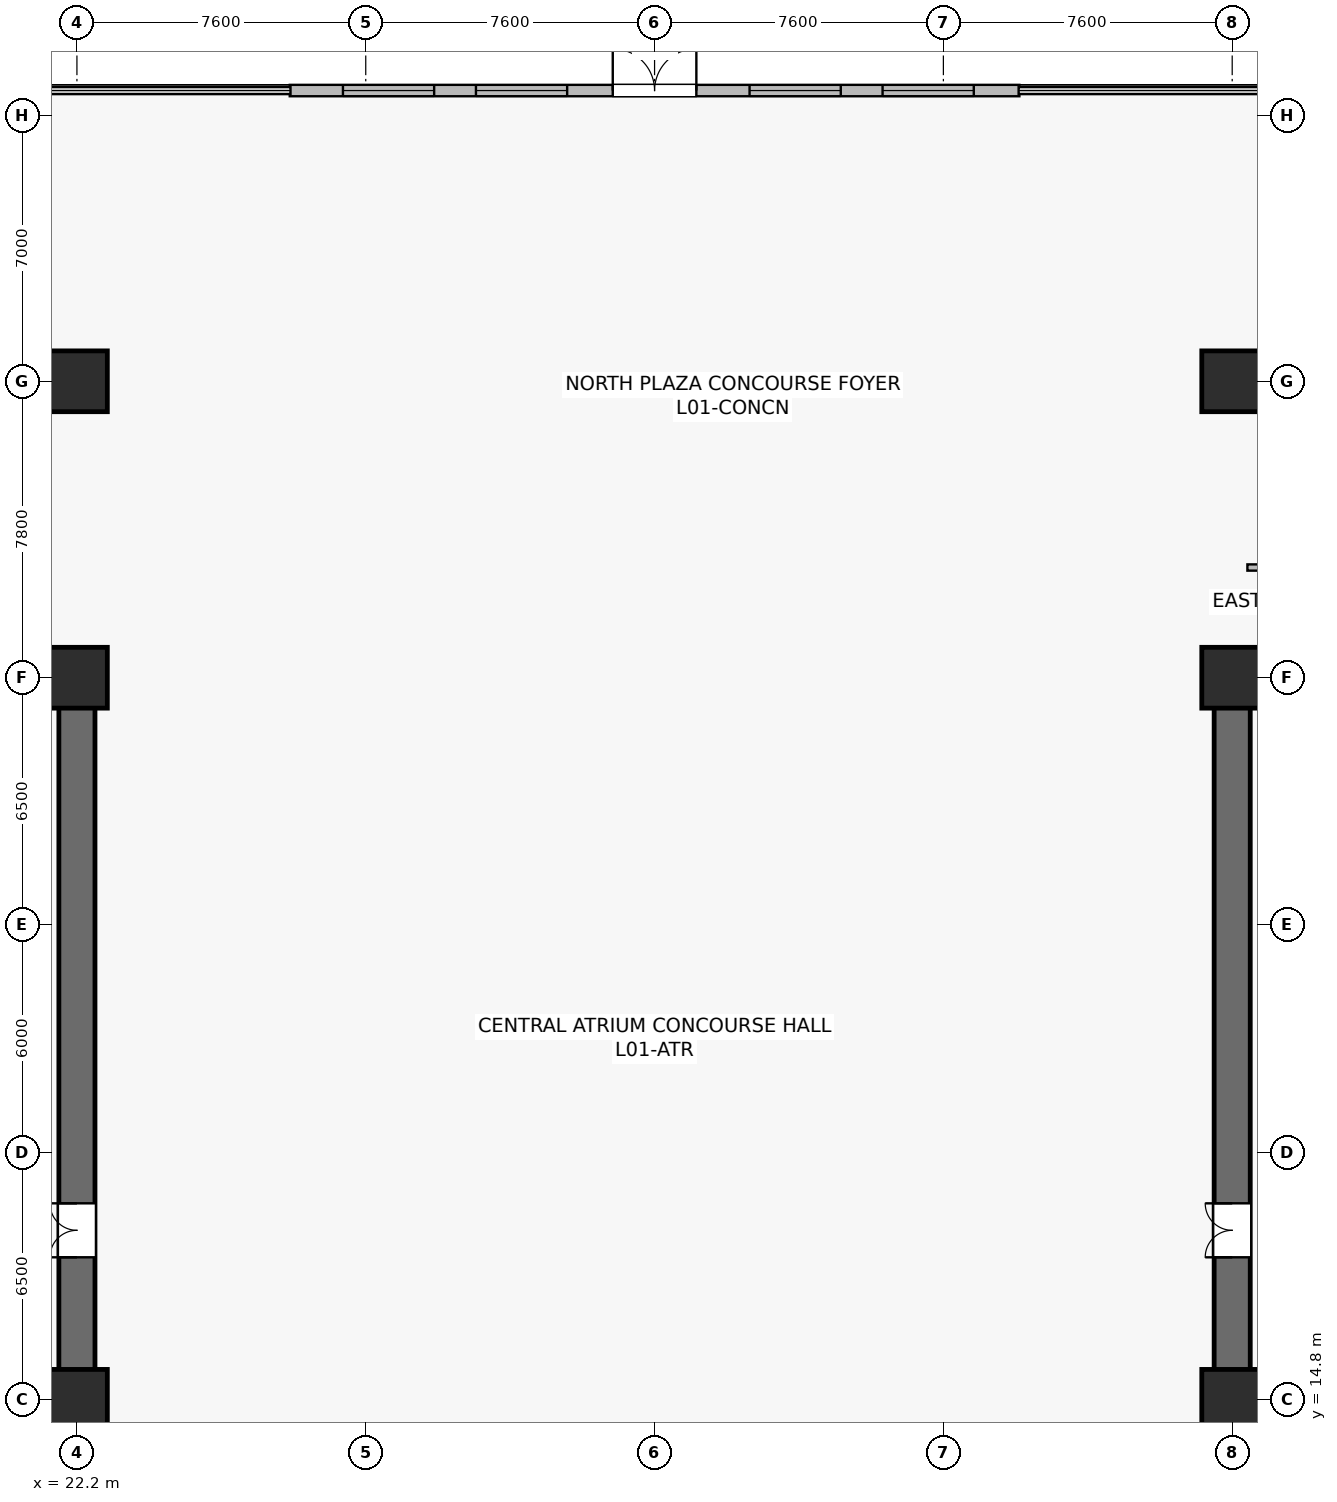
"""IFC4 building model, lengths in metres.
Left out: names, types, materials, properties, quantities, classifications, styles, units other than length and angle.
Written with IfcOpenShell. Run it as: python <this file> out.ifc"""

import sys

from ifc_helpers import new_model, si_unit, direction, frame, frame_2d, origin, origin_2d, place, context, subcontext, project, spatial, rectangle, extrude, source, transform, mapped, element, fill, save


model = new_model("IFC4")
c1 = context("Model", 3, precision=1e-05, world=origin(), true_north=direction((0.0, 1.0)))
c2 = subcontext(c1, "Body", "Model", "MODEL_VIEW")
j1 = project(units=[si_unit("LENGTHUNIT", "METRE"), si_unit("PLANEANGLEUNIT", "RADIAN")], contexts=[c1])
p1 = place(None, origin())
s1 = spatial("IfcSite", under=j1, at=p1, CompositionType="ELEMENT")
p2 = place(p1, origin())
s2 = spatial("IfcBuilding", under=s1, at=p2, CompositionType="ELEMENT")
p3 = place(p2, origin())
s3 = spatial("IfcBuildingStorey", under=s2, at=p3, CompositionType="ELEMENT", Elevation=0.0)
p4 = place(p3, frame((6.925, 14.8, 0.0), z_axis=(0.0, 0.0, 1.0), x_axis=(1.0, 0.0, 0.0)))
e1 = element("IfcWall", 1, at=p4, inside=s3, PredefinedType="SHEAR", context=c2, shape_type="SweptSolid", body=[
    extrude(rectangle(XDim=15.75, YDim=0.95, at=frame_2d((7.875, 0.0))), origin(), (0.0, 0.0, 1.0), 5.05),
])
p5 = place(p4, frame((12.275, 0.0, 0.0)))
e2 = element("IfcOpeningElement", 2, at=p5, cuts=e1, PredefinedType="OPENING", context=c2, shape_type="SweptSolid", body=[
    extrude(rectangle(XDim=1.2, YDim=2.16, at=frame_2d((0.6, 1.08))), frame((0.0, 0.485, 0.0), z_axis=(0.0, -1.0, 0.0), x_axis=(1.0, 0.0, 0.0)), (0.0, 0.0, 1.0), 0.97),
])
p6 = place(p3, frame((6.925, 33.8, 0.0), z_axis=(0.0, 0.0, 1.0), x_axis=(1.0, 0.0, 0.0)))
e3 = element("IfcWall", 3, at=p6, inside=s3, PredefinedType="SHEAR", context=c2, shape_type="SweptSolid", body=[
    extrude(rectangle(XDim=15.75, YDim=0.95, at=frame_2d((7.875, 0.0))), origin(), (0.0, 0.0, 1.0), 5.05),
])
p7 = place(p6, frame((8.525, 0.0, 0.0)))
e4 = element("IfcOpeningElement", 4, at=p7, cuts=e3, PredefinedType="OPENING", context=c2, shape_type="SweptSolid", body=[
    extrude(rectangle(XDim=0.95, YDim=2.15, at=frame_2d((0.475, 1.075))), frame((0.0, 0.485, 0.0), z_axis=(0.0, -1.0, 0.0), x_axis=(1.0, 0.0, 0.0)), (0.0, 0.0, 1.0), 0.97),
])
p8 = place(p6, frame((12.065, 0.0, 0.0)))
e5 = element("IfcOpeningElement", 5, at=p8, cuts=e3, PredefinedType="OPENING", context=c2, shape_type="SweptSolid", body=[
    extrude(rectangle(XDim=0.95, YDim=2.15, at=frame_2d((0.475, 1.075))), frame((0.0, 0.485, 0.0), z_axis=(0.0, -1.0, 0.0), x_axis=(1.0, 0.0, 0.0)), (0.0, 0.0, 1.0), 0.97),
])
p9 = place(p3, frame((22.2, 15.275, 0.0), z_axis=(0.0, 0.0, 1.0), x_axis=(0.0, 1.0, 0.0)))
e6 = element("IfcWall", 6, at=p9, inside=s3, PredefinedType="SHEAR", context=c2, shape_type="SweptSolid", body=[
    extrude(rectangle(XDim=18.05, YDim=0.95, at=frame_2d((9.025, 0.0))), origin(), (0.0, 0.0, 1.0), 5.05),
])
p10 = place(p9, frame((3.275, 0.0, 0.0)))
e7 = element("IfcOpeningElement", 7, at=p10, cuts=e6, PredefinedType="OPENING", context=c2, shape_type="SweptSolid", body=[
    extrude(rectangle(XDim=1.42, YDim=2.2, at=frame_2d((0.71, 1.1))), frame((0.0, 0.485, 0.0), z_axis=(0.0, -1.0, 0.0), x_axis=(1.0, 0.0, 0.0)), (0.0, 0.0, 1.0), 0.97),
])
p11 = place(p3, frame((52.125, 14.8, 0.0), z_axis=(0.0, 0.0, 1.0), x_axis=(1.0, 0.0, 0.0)))
e8 = element("IfcWall", 8, at=p11, inside=s3, PredefinedType="SHEAR", context=c2, shape_type="SweptSolid", body=[
    extrude(rectangle(XDim=15.75, YDim=0.95, at=frame_2d((7.875, 0.0))), origin(), (0.0, 0.0, 1.0), 5.05),
])
p12 = place(p11, frame((2.275, 0.0, 0.0)))
e9 = element("IfcOpeningElement", 9, at=p12, cuts=e8, PredefinedType="OPENING", context=c2, shape_type="SweptSolid", body=[
    extrude(rectangle(XDim=1.2, YDim=2.16, at=frame_2d((0.6, 1.08))), frame((0.0, 0.485, 0.0), z_axis=(0.0, -1.0, 0.0), x_axis=(1.0, 0.0, 0.0)), (0.0, 0.0, 1.0), 0.97),
])
p13 = place(p3, frame((52.125, 33.8, 0.0), z_axis=(0.0, 0.0, 1.0), x_axis=(1.0, 0.0, 0.0)))
e10 = element("IfcWall", 10, at=p13, inside=s3, PredefinedType="SHEAR", context=c2, shape_type="SweptSolid", body=[
    extrude(rectangle(XDim=15.75, YDim=0.95, at=frame_2d((7.875, 0.0))), origin(), (0.0, 0.0, 1.0), 5.05),
])
p14 = place(p13, frame((6.275, 0.0, 0.0)))
e11 = element("IfcOpeningElement", 11, at=p14, cuts=e10, PredefinedType="OPENING", context=c2, shape_type="SweptSolid", body=[
    extrude(rectangle(XDim=0.95, YDim=2.15, at=frame_2d((0.475, 1.075))), frame((0.0, 0.485, 0.0), z_axis=(0.0, -1.0, 0.0), x_axis=(1.0, 0.0, 0.0)), (0.0, 0.0, 1.0), 0.97),
])
p15 = place(p13, frame((2.735, 0.0, 0.0)))
e12 = element("IfcOpeningElement", 12, at=p15, cuts=e10, PredefinedType="OPENING", context=c2, shape_type="SweptSolid", body=[
    extrude(rectangle(XDim=0.95, YDim=2.15, at=frame_2d((0.475, 1.075))), frame((0.0, 0.485, 0.0), z_axis=(0.0, -1.0, 0.0), x_axis=(1.0, 0.0, 0.0)), (0.0, 0.0, 1.0), 0.97),
])
p16 = place(p3, frame((52.6, 15.275, 0.0), z_axis=(0.0, 0.0, 1.0), x_axis=(0.0, 1.0, 0.0)))
e13 = element("IfcWall", 13, at=p16, inside=s3, PredefinedType="SHEAR", context=c2, shape_type="SweptSolid", body=[
    extrude(rectangle(XDim=18.05, YDim=0.95, at=frame_2d((9.025, 0.0))), origin(), (0.0, 0.0, 1.0), 5.05),
])
p17 = place(p16, frame((3.275, 0.0, 0.0)))
e14 = element("IfcOpeningElement", 14, at=p17, cuts=e13, PredefinedType="OPENING", context=c2, shape_type="SweptSolid", body=[
    extrude(rectangle(XDim=1.42, YDim=2.2, at=frame_2d((0.71, 1.1))), frame((0.0, 0.485, 0.0), z_axis=(0.0, -1.0, 0.0), x_axis=(1.0, 0.0, 0.0)), (0.0, 0.0, 1.0), 0.97),
])
m1 = source(origin(), c2, "Body", "SweptSolid", [
    extrude(rectangle(XDim=1.6, YDim=1.6, at=origin_2d()), origin(), (0.0, 0.0, 1.0), 5.4),
])
for number, where, z_axis, x_axis in (
    (15, (22.2, 14.8, 0.0), (0.0, 0.0, 1.0), (1.0, 0.0, 0.0)),
    (16, (22.2, 33.8, 0.0), (0.0, 0.0, 1.0), (1.0, 0.0, 0.0)),
    (17, (22.2, 41.6, 0.0), (0.0, 0.0, 1.0), (1.0, 0.0, 0.0)),
    (18, (52.6, 14.8, 0.0), (0.0, 0.0, 1.0), (1.0, 0.0, 0.0)),
    (19, (52.6, 33.8, 0.0), (0.0, 0.0, 1.0), (1.0, 0.0, 0.0)),
    (20, (52.6, 41.6, 0.0), (0.0, 0.0, 1.0), (1.0, 0.0, 0.0)),
):
    element("IfcColumn", number, at=place(p3, frame(where, z_axis=z_axis, x_axis=x_axis)), inside=s3, PredefinedType="COLUMN", context=c2, shape_type="MappedRepresentation", body=[
        mapped(m1, transform((0.0, 0.0, 0.0), scale=1.0)),
    ])
p18 = place(p3, frame((27.8, 49.25, 0.0), z_axis=(0.0, 0.0, 1.0), x_axis=(1.0, 0.0, 0.0)))
e21 = element("IfcWall", 21, at=p18, inside=s3, PredefinedType="STANDARD", context=c2, shape_type="SweptSolid", body=[
    extrude(rectangle(XDim=19.2, YDim=0.3, at=frame_2d((9.6, 0.0))), origin(), (0.0, 0.0, 1.0), 5.05),
])
p19 = place(p18, frame((8.5, 0.0, 0.0)))
e22 = element("IfcOpeningElement", 22, at=p19, cuts=e21, PredefinedType="OPENING", context=c2, shape_type="SweptSolid", body=[
    extrude(rectangle(XDim=2.2, YDim=2.6, at=frame_2d((1.1, 1.3))), frame((0.0, 0.16, 0.0), z_axis=(0.0, -1.0, 0.0), x_axis=(1.0, 0.0, 0.0)), (0.0, 0.0, 1.0), 0.32),
])
p20 = place(p18, frame((1.4, 0.0, 0.9)))
e23 = element("IfcOpeningElement", 23, at=p20, cuts=e21, PredefinedType="OPENING", context=c2, shape_type="SweptSolid", body=[
    extrude(rectangle(XDim=2.4, YDim=2.8, at=frame_2d((1.2, 1.4))), frame((0.0, 0.16, 0.0), z_axis=(0.0, -1.0, 0.0), x_axis=(1.0, 0.0, 0.0)), (0.0, 0.0, 1.0), 0.32),
])
p21 = place(p18, frame((4.9, 0.0, 0.9)))
e24 = element("IfcOpeningElement", 24, at=p21, cuts=e21, PredefinedType="OPENING", context=c2, shape_type="SweptSolid", body=[
    extrude(rectangle(XDim=2.4, YDim=2.8, at=frame_2d((1.2, 1.4))), frame((0.0, 0.16, 0.0), z_axis=(0.0, -1.0, 0.0), x_axis=(1.0, 0.0, 0.0)), (0.0, 0.0, 1.0), 0.32),
])
p22 = place(p18, frame((12.1, 0.0, 0.9)))
e25 = element("IfcOpeningElement", 25, at=p22, cuts=e21, PredefinedType="OPENING", context=c2, shape_type="SweptSolid", body=[
    extrude(rectangle(XDim=2.4, YDim=2.8, at=frame_2d((1.2, 1.4))), frame((0.0, 0.16, 0.0), z_axis=(0.0, -1.0, 0.0), x_axis=(1.0, 0.0, 0.0)), (0.0, 0.0, 1.0), 0.32),
])
p23 = place(p18, frame((15.6, 0.0, 0.9)))
e26 = element("IfcOpeningElement", 26, at=p23, cuts=e21, PredefinedType="OPENING", context=c2, shape_type="SweptSolid", body=[
    extrude(rectangle(XDim=2.4, YDim=2.8, at=frame_2d((1.2, 1.4))), frame((0.0, 0.16, 0.0), z_axis=(0.0, -1.0, 0.0), x_axis=(1.0, 0.0, 0.0)), (0.0, 0.0, 1.0), 0.32),
])
p24 = place(p3, frame((22.45, 14.4, 0.0), z_axis=(0.0, 0.0, 1.0), x_axis=(0.0, -1.0, 0.0)))
e27 = element("IfcWall", 27, at=p24, inside=s3, PredefinedType="SOLIDWALL", context=c2, shape_type="SweptSolid", body=[
    extrude(rectangle(XDim=15.05, YDim=0.2, at=frame_2d((7.525, 0.0))), origin(), (0.0, 0.0, 1.0), 4.335),
])
p25 = place(p24, frame((3.43, 0.0, 0.0)))
e28 = element("IfcOpeningElement", 28, at=p25, cuts=e27, PredefinedType="OPENING", context=c2, shape_type="SweptSolid", body=[
    extrude(rectangle(XDim=1.42, YDim=2.2, at=frame_2d((0.71, 1.1))), frame((0.0, 0.11, 0.0), z_axis=(0.0, -1.0, 0.0), x_axis=(1.0, 0.0, 0.0)), (0.0, 0.0, 1.0), 0.22),
])
p26 = place(p3, frame((53.0, 36.7, 0.0), z_axis=(0.0, 0.0, 1.0), x_axis=(1.0, 0.0, 0.0)))
e29 = element("IfcWall", 29, at=p26, inside=s3, PredefinedType="PARTITIONING", context=c2, shape_type="SweptSolid", body=[
    extrude(rectangle(XDim=14.6, YDim=0.165, at=frame_2d((7.3, 0.0))), origin(), (0.0, 0.0, 1.0), 4.335),
])
p27 = place(p26, frame((6.4, 0.0, 0.0)))
e30 = element("IfcOpeningElement", 30, at=p27, cuts=e29, PredefinedType="OPENING", context=c2, shape_type="SweptSolid", body=[
    extrude(rectangle(XDim=1.1, YDim=2.18, at=frame_2d((0.55, 1.09))), frame((0.0, 0.093, 0.0), z_axis=(0.0, -1.0, 0.0), x_axis=(1.0, 0.0, 0.0)), (0.0, 0.0, 1.0), 0.185),
])
m2 = source(origin(), c2, "Body", "SweptSolid", [
    extrude(rectangle(XDim=2.2, YDim=2.6, at=frame_2d((1.1, 1.3))), frame((0.0, 0.025, 0.0), z_axis=(0.0, -1.0, 0.0), x_axis=(1.0, 0.0, 0.0)), (0.0, 0.0, 1.0), 0.05),
])
p28 = place(p19, origin())
e31 = element("IfcDoor", 31, at=p28, inside=s3, OperationType="DOUBLE_DOOR_SINGLE_SWING", PredefinedType="DOOR", context=c2, shape_type="MappedRepresentation", body=[
    mapped(m2, transform((0.0, 0.0, 0.0), scale=1.0)),
])
fill(e22, e31)
m3 = source(origin(), c2, "Body", "SweptSolid", [
    extrude(rectangle(XDim=2.4, YDim=2.8, at=frame_2d((1.2, 1.4))), frame((0.0, 0.03, 0.0), z_axis=(0.0, -1.0, 0.0), x_axis=(1.0, 0.0, 0.0)), (0.0, 0.0, 1.0), 0.06),
])
p29 = place(p20, origin())
e32 = element("IfcWindow", 32, at=p29, inside=s3, PartitioningType="SINGLE_PANEL", PredefinedType="WINDOW", context=c2, shape_type="MappedRepresentation", body=[
    mapped(m3, transform((0.0, 0.0, 0.0), scale=1.0)),
])
fill(e23, e32)
p30 = place(p21, origin())
e33 = element("IfcWindow", 33, at=p30, inside=s3, PartitioningType="SINGLE_PANEL", PredefinedType="WINDOW", context=c2, shape_type="MappedRepresentation", body=[
    mapped(m3, transform((0.0, 0.0, 0.0), scale=1.0)),
])
fill(e24, e33)
p31 = place(p22, origin())
e34 = element("IfcWindow", 34, at=p31, inside=s3, PartitioningType="SINGLE_PANEL", PredefinedType="WINDOW", context=c2, shape_type="MappedRepresentation", body=[
    mapped(m3, transform((0.0, 0.0, 0.0), scale=1.0)),
])
fill(e25, e34)
p32 = place(p23, origin())
e35 = element("IfcWindow", 35, at=p32, inside=s3, PartitioningType="SINGLE_PANEL", PredefinedType="WINDOW", context=c2, shape_type="MappedRepresentation", body=[
    mapped(m3, transform((0.0, 0.0, 0.0), scale=1.0)),
])
fill(e26, e35)
m4 = source(origin(), c2, "Body", "SweptSolid", [
    extrude(rectangle(XDim=1.42, YDim=2.2, at=frame_2d((0.71, 1.1))), frame((0.0, 0.025, 0.0), z_axis=(0.0, -1.0, 0.0), x_axis=(1.0, 0.0, 0.0)), (0.0, 0.0, 1.0), 0.05),
])
p33 = place(p10, origin())
e36 = element("IfcDoor", 36, at=p33, inside=s3, OperationType="DOUBLE_DOOR_SINGLE_SWING", PredefinedType="DOOR", context=c2, shape_type="MappedRepresentation", body=[
    mapped(m4, transform((0.0, 0.0, 0.0), scale=1.0)),
])
fill(e7, e36)
p34 = place(p17, origin())
e37 = element("IfcDoor", 37, at=p34, inside=s3, OperationType="DOUBLE_DOOR_SINGLE_SWING", PredefinedType="DOOR", context=c2, shape_type="MappedRepresentation", body=[
    mapped(m4, transform((0.0, 0.0, 0.0), scale=1.0)),
])
fill(e14, e37)
save(model, sys.argv[1])
